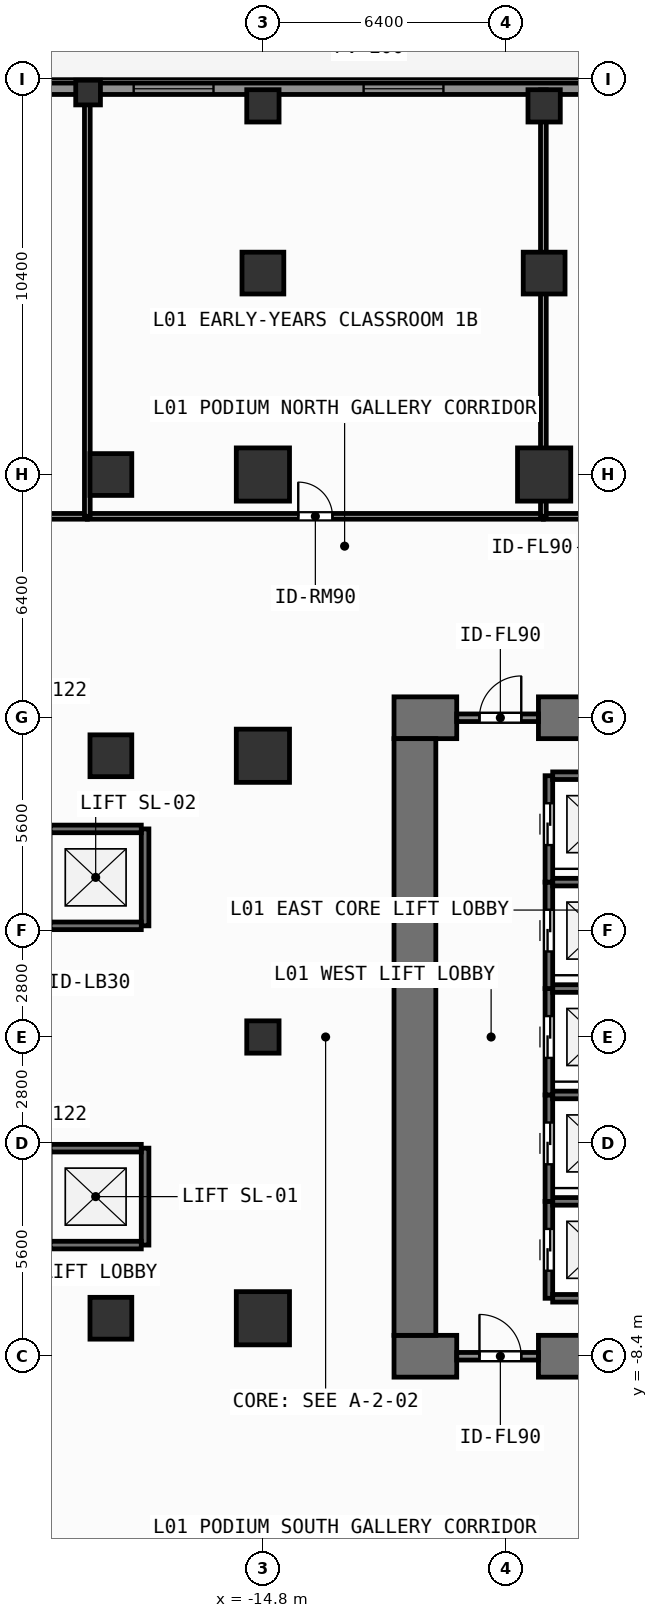
"""IFC4 building model, lengths in metres.
Left out: names, types, materials, properties, quantities, classifications, styles, units other than length and angle.
Written with IfcOpenShell. Run it as: python <this file> out.ifc"""

import sys

from ifc_helpers import new_model, si_unit, direction, frame, frame_2d, origin, origin_2d, place, context, subcontext, project, spatial, rectangle, extrude, element, fill, save


model = new_model("IFC4")
c1 = context("Model", 3, precision=1e-05, world=origin(), true_north=direction((0.0, 1.0)))
c2 = subcontext(c1, "Body", "Model", "MODEL_VIEW")
j1 = project(units=[si_unit("LENGTHUNIT", "METRE"), si_unit("PLANEANGLEUNIT", "RADIAN")], contexts=[c1])
p1 = place(None, origin())
s1 = spatial("IfcSite", under=j1, at=p1, CompositionType="ELEMENT")
p2 = place(p1, origin())
s2 = spatial("IfcBuilding", under=s1, at=p2, CompositionType="ELEMENT")
p3 = place(p2, origin())
s3 = spatial("IfcBuildingStorey", under=s2, at=p3, CompositionType="ELEMENT", Elevation=0.0)
p4 = place(p3, frame((-11.35, -8.4, 0.0), z_axis=(0.0, 0.0, 1.0), x_axis=(1.0, 0.0, 0.0)))
e1 = element("IfcWall", 1, at=p4, inside=s3, PredefinedType="SHEAR", context=c2, shape_type="SweptSolid", body=[
    extrude(rectangle(XDim=1.65, YDim=1.1, at=frame_2d((0.825, 0.0))), origin(), (0.0, 0.0, 1.0), 4.8),
])
p5 = place(p3, frame((-7.55, -8.4, 0.0), z_axis=(0.0, 0.0, 1.0), x_axis=(1.0, 0.0, 0.0)))
e2 = element("IfcWall", 2, at=p5, inside=s3, PredefinedType="SHEAR", context=c2, shape_type="SweptSolid", body=[
    extrude(rectangle(XDim=3.35, YDim=1.1, at=frame_2d((1.675, 0.0))), origin(), (0.0, 0.0, 1.0), 4.8),
])
p6 = place(p3, frame((-11.35, 8.4, 0.0), z_axis=(0.0, 0.0, 1.0), x_axis=(1.0, 0.0, 0.0)))
e3 = element("IfcWall", 3, at=p6, inside=s3, PredefinedType="SHEAR", context=c2, shape_type="SweptSolid", body=[
    extrude(rectangle(XDim=1.65, YDim=1.1, at=frame_2d((0.825, 0.0))), origin(), (0.0, 0.0, 1.0), 4.8),
])
p7 = place(p3, frame((-7.55, 8.4, 0.0), z_axis=(0.0, 0.0, 1.0), x_axis=(1.0, 0.0, 0.0)))
e4 = element("IfcWall", 4, at=p7, inside=s3, PredefinedType="SHEAR", context=c2, shape_type="SweptSolid", body=[
    extrude(rectangle(XDim=16.5, YDim=1.1, at=frame_2d((8.25, 0.0))), origin(), (0.0, 0.0, 1.0), 4.8),
])
p8 = place(p3, frame((-10.8, -7.85, 0.0), z_axis=(0.0, 0.0, 1.0), x_axis=(0.0, 1.0, 0.0)))
e5 = element("IfcWall", 5, at=p8, inside=s3, PredefinedType="SHEAR", context=c2, shape_type="SweptSolid", body=[
    extrude(rectangle(XDim=15.7, YDim=1.1, at=frame_2d((7.85, 0.0))), origin(), (0.0, 0.0, 1.0), 4.8),
])
for number, where, z_axis, x_axis in (
    (6, (-14.8, 14.8, 0.0), (0.0, 0.0, 1.0), (1.0, 0.0, 0.0)),
    (7, (-7.4, 14.8, 0.0), (0.0, 0.0, 1.0), (1.0, 0.0, 0.0)),
    (8, (-14.8, -7.4, 0.0), (0.0, 0.0, 1.0), (1.0, 0.0, 0.0)),
    (9, (-14.8, 7.4, 0.0), (0.0, 0.0, 1.0), (1.0, 0.0, 0.0)),
):
    element("IfcColumn", number, at=place(p3, frame(where, z_axis=z_axis, x_axis=x_axis)), inside=s3, PredefinedType="COLUMN", context=c2, shape_type="SweptSolid", body=[
        extrude(rectangle(XDim=1.4, YDim=1.4, at=origin_2d()), origin(), (0.0, 0.0, 1.0), 4.8),
    ])
for number, where, z_axis, x_axis in (
    (10, (-18.8, -7.4, 0.0), (0.0, 0.0, 1.0), (1.0, 0.0, 0.0)),
    (11, (-18.8, 7.4, 0.0), (0.0, 0.0, 1.0), (1.0, 0.0, 0.0)),
    (12, (-18.8, 14.8, 0.0), (0.0, 0.0, 1.0), (1.0, 0.0, 0.0)),
    (13, (-14.8, 20.1, 0.0), (0.0, 0.0, 1.0), (1.0, 0.0, 0.0)),
    (14, (-7.4, 20.1, 0.0), (0.0, 0.0, 1.0), (1.0, 0.0, 0.0)),
):
    element("IfcColumn", number, at=place(p3, frame(where, z_axis=z_axis, x_axis=x_axis)), inside=s3, PredefinedType="COLUMN", context=c2, shape_type="SweptSolid", body=[
        extrude(rectangle(XDim=1.1, YDim=1.1, at=origin_2d()), origin(), (0.0, 0.0, 1.0), 4.8),
    ])
for number, where, z_axis, x_axis in (
    (15, (-14.8, 0.0, 0.0), (0.0, 0.0, 1.0), (1.0, 0.0, 0.0)),
    (16, (-14.8, 24.5, 0.0), (0.0, 0.0, 1.0), (1.0, 0.0, 0.0)),
    (17, (-7.4, 24.5, 0.0), (0.0, 0.0, 1.0), (1.0, 0.0, 0.0)),
):
    element("IfcColumn", number, at=place(p3, frame(where, z_axis=z_axis, x_axis=x_axis)), inside=s3, PredefinedType="COLUMN", context=c2, shape_type="SweptSolid", body=[
        extrude(rectangle(XDim=0.85, YDim=0.85, at=origin_2d()), origin(), (0.0, 0.0, 1.0), 4.8),
    ])
p9 = place(p3, frame((-19.4, 24.85, 0.0), z_axis=(0.0, 0.0, 1.0), x_axis=(1.0, 0.0, 0.0)))
e18 = element("IfcColumn", 18, at=p9, inside=s3, PredefinedType="PILASTER", context=c2, shape_type="SweptSolid", body=[
    extrude(rectangle(XDim=0.65, YDim=0.65, at=origin_2d()), origin(), (0.0, 0.0, 1.0), 4.8),
])
p10 = place(p3, frame((-29.1, 24.95, 0.0), z_axis=(0.0, 0.0, 1.0), x_axis=(1.0, 0.0, 0.0)))
e19 = element("IfcWall", 19, at=p10, inside=s3, PredefinedType="SOLIDWALL", context=c2, shape_type="SweptSolid", body=[
    extrude(rectangle(XDim=58.2, YDim=0.3, at=frame_2d((29.1, 0.0))), origin(), (0.0, 0.0, 1.0), 4.56),
])
p11 = place(p10, frame((10.9, 0.0, 0.85)))
e20 = element("IfcOpeningElement", 20, at=p11, cuts=e19, PredefinedType="OPENING", context=c2, shape_type="SweptSolid", body=[
    extrude(rectangle(XDim=2.1, YDim=2.2, at=frame_2d((1.05, 1.1))), frame((0.0, 0.16, 0.0), z_axis=(0.0, -1.0, 0.0), x_axis=(1.0, 0.0, 0.0)), (0.0, 0.0, 1.0), 0.32),
])
p12 = place(p10, frame((16.95, 0.0, 0.85)))
e21 = element("IfcOpeningElement", 21, at=p12, cuts=e19, PredefinedType="OPENING", context=c2, shape_type="SweptSolid", body=[
    extrude(rectangle(XDim=2.1, YDim=2.2, at=frame_2d((1.05, 1.1))), frame((0.0, 0.16, 0.0), z_axis=(0.0, -1.0, 0.0), x_axis=(1.0, 0.0, 0.0)), (0.0, 0.0, 1.0), 0.32),
])
p13 = place(p10, frame((23.84, 0.0, 0.85)))
e22 = element("IfcOpeningElement", 22, at=p13, cuts=e19, PredefinedType="OPENING", context=c2, shape_type="SweptSolid", body=[
    extrude(rectangle(XDim=2.1, YDim=2.2, at=frame_2d((1.05, 1.1))), frame((0.0, 0.16, 0.0), z_axis=(0.0, -1.0, 0.0), x_axis=(1.0, 0.0, 0.0)), (0.0, 0.0, 1.0), 0.32),
])
p14 = place(p10, frame((30.44, 0.0, 0.85)))
e23 = element("IfcOpeningElement", 23, at=p14, cuts=e19, PredefinedType="OPENING", context=c2, shape_type="SweptSolid", body=[
    extrude(rectangle(XDim=2.1, YDim=2.2, at=frame_2d((1.05, 1.1))), frame((0.0, 0.16, 0.0), z_axis=(0.0, -1.0, 0.0), x_axis=(1.0, 0.0, 0.0)), (0.0, 0.0, 1.0), 0.32),
])
p15 = place(p10, frame((39.25, 0.0, 0.0)))
e24 = element("IfcOpeningElement", 24, at=p15, cuts=e19, PredefinedType="OPENING", context=c2, shape_type="SweptSolid", body=[
    extrude(rectangle(XDim=1.3, YDim=2.2, at=frame_2d((0.65, 1.1))), frame((0.0, 0.16, 0.0), z_axis=(0.0, -1.0, 0.0), x_axis=(1.0, 0.0, 0.0)), (0.0, 0.0, 1.0), 0.32),
])
p16 = place(p10, frame((49.25, 0.0, 0.0)))
e25 = element("IfcOpeningElement", 25, at=p16, cuts=e19, PredefinedType="OPENING", context=c2, shape_type="SweptSolid", body=[
    extrude(rectangle(XDim=1.3, YDim=2.2, at=frame_2d((0.65, 1.1))), frame((0.0, 0.16, 0.0), z_axis=(0.0, -1.0, 0.0), x_axis=(1.0, 0.0, 0.0)), (0.0, 0.0, 1.0), 0.32),
])
p17 = place(p3, frame((-17.9, -5.475, 0.0), z_axis=(0.0, 0.0, 1.0), x_axis=(0.0, 1.0, 0.0)))
e26 = element("IfcWall", 26, at=p17, inside=s3, PredefinedType="SHEAR", context=c2, shape_type="SweptSolid", body=[
    extrude(rectangle(XDim=2.55, YDim=0.2, at=frame_2d((1.275, 0.0))), origin(), (0.0, 0.0, 1.0), 4.56),
])
for number, where, z_axis, x_axis in (
    (27, (-20.4, -5.475, 0.0), (0.0, 0.0, 1.0), (1.0, 0.0, 0.0)),
    (28, (-20.4, -2.925, 0.0), (0.0, 0.0, 1.0), (1.0, 0.0, 0.0)),
):
    element("IfcWall", number, at=place(p3, frame(where, z_axis=z_axis, x_axis=x_axis)), inside=s3, PredefinedType="SHEAR", context=c2, shape_type="SweptSolid", body=[
        extrude(rectangle(XDim=2.4, YDim=0.2, at=frame_2d((1.2, 0.0))), origin(), (0.0, 0.0, 1.0), 4.56),
    ])
p18 = place(p3, frame((-17.9, 2.925, 0.0), z_axis=(0.0, 0.0, 1.0), x_axis=(0.0, 1.0, 0.0)))
e29 = element("IfcWall", 29, at=p18, inside=s3, PredefinedType="SHEAR", context=c2, shape_type="SweptSolid", body=[
    extrude(rectangle(XDim=2.55, YDim=0.2, at=frame_2d((1.275, 0.0))), origin(), (0.0, 0.0, 1.0), 4.56),
])
for number, where, z_axis, x_axis in (
    (30, (-20.4, 2.925, 0.0), (0.0, 0.0, 1.0), (1.0, 0.0, 0.0)),
    (31, (-20.4, 5.475, 0.0), (0.0, 0.0, 1.0), (1.0, 0.0, 0.0)),
):
    element("IfcWall", number, at=place(p3, frame(where, z_axis=z_axis, x_axis=x_axis)), inside=s3, PredefinedType="SHEAR", context=c2, shape_type="SweptSolid", body=[
        extrude(rectangle(XDim=2.4, YDim=0.2, at=frame_2d((1.2, 0.0))), origin(), (0.0, 0.0, 1.0), 4.56),
    ])
p19 = place(p3, frame((-7.275, -6.875, 0.0), z_axis=(0.0, 0.0, 1.0), x_axis=(0.0, 1.0, 0.0)))
e32 = element("IfcWall", 32, at=p19, inside=s3, PredefinedType="SHEAR", context=c2, shape_type="SweptSolid", body=[
    extrude(rectangle(XDim=2.55, YDim=0.2, at=frame_2d((1.275, 0.0))), origin(), (0.0, 0.0, 1.0), 4.56),
])
p20 = place(p19, frame((0.725, 0.0, 0.0)))
e33 = element("IfcOpeningElement", 33, at=p20, cuts=e32, PredefinedType="OPENING", context=c2, shape_type="SweptSolid", body=[
    extrude(rectangle(XDim=1.1, YDim=2.2, at=frame_2d((0.55, 1.1))), frame((0.0, 0.11, 0.0), z_axis=(0.0, -1.0, 0.0), x_axis=(1.0, 0.0, 0.0)), (0.0, 0.0, 1.0), 0.22),
])
for number, where, z_axis, x_axis in (
    (34, (-7.175, -6.875, 0.0), (0.0, 0.0, 1.0), (1.0, 0.0, 0.0)),
    (35, (-7.175, -4.325, 0.0), (0.0, 0.0, 1.0), (1.0, 0.0, 0.0)),
):
    element("IfcWall", number, at=place(p3, frame(where, z_axis=z_axis, x_axis=x_axis)), inside=s3, PredefinedType="SHEAR", context=c2, shape_type="SweptSolid", body=[
        extrude(rectangle(XDim=2.35, YDim=0.2, at=frame_2d((1.175, 0.0))), origin(), (0.0, 0.0, 1.0), 4.56),
    ])
p21 = place(p3, frame((-7.275, -4.325, 0.0), z_axis=(0.0, 0.0, 1.0), x_axis=(0.0, 1.0, 0.0)))
e36 = element("IfcWall", 36, at=p21, inside=s3, PredefinedType="SHEAR", context=c2, shape_type="SweptSolid", body=[
    extrude(rectangle(XDim=2.8, YDim=0.2, at=frame_2d((1.4, 0.0))), origin(), (0.0, 0.0, 1.0), 4.56),
])
p22 = place(p21, frame((0.975, 0.0, 0.0)))
e37 = element("IfcOpeningElement", 37, at=p22, cuts=e36, PredefinedType="OPENING", context=c2, shape_type="SweptSolid", body=[
    extrude(rectangle(XDim=1.1, YDim=2.2, at=frame_2d((0.55, 1.1))), frame((0.0, 0.11, 0.0), z_axis=(0.0, -1.0, 0.0), x_axis=(1.0, 0.0, 0.0)), (0.0, 0.0, 1.0), 0.22),
])
p23 = place(p3, frame((-7.175, -1.525, 0.0), z_axis=(0.0, 0.0, 1.0), x_axis=(1.0, 0.0, 0.0)))
e38 = element("IfcWall", 38, at=p23, inside=s3, PredefinedType="SHEAR", context=c2, shape_type="SweptSolid", body=[
    extrude(rectangle(XDim=2.35, YDim=0.2, at=frame_2d((1.175, 0.0))), origin(), (0.0, 0.0, 1.0), 4.56),
])
p24 = place(p3, frame((-7.275, -1.525, 0.0), z_axis=(0.0, 0.0, 1.0), x_axis=(0.0, 1.0, 0.0)))
e39 = element("IfcWall", 39, at=p24, inside=s3, PredefinedType="SHEAR", context=c2, shape_type="SweptSolid", body=[
    extrude(rectangle(XDim=2.8, YDim=0.2, at=frame_2d((1.4, 0.0))), origin(), (0.0, 0.0, 1.0), 4.56),
])
p25 = place(p24, frame((0.975, 0.0, 0.0)))
e40 = element("IfcOpeningElement", 40, at=p25, cuts=e39, PredefinedType="OPENING", context=c2, shape_type="SweptSolid", body=[
    extrude(rectangle(XDim=1.1, YDim=2.2, at=frame_2d((0.55, 1.1))), frame((0.0, 0.11, 0.0), z_axis=(0.0, -1.0, 0.0), x_axis=(1.0, 0.0, 0.0)), (0.0, 0.0, 1.0), 0.22),
])
p26 = place(p3, frame((-7.175, 1.275, 0.0), z_axis=(0.0, 0.0, 1.0), x_axis=(1.0, 0.0, 0.0)))
e41 = element("IfcWall", 41, at=p26, inside=s3, PredefinedType="SHEAR", context=c2, shape_type="SweptSolid", body=[
    extrude(rectangle(XDim=2.35, YDim=0.2, at=frame_2d((1.175, 0.0))), origin(), (0.0, 0.0, 1.0), 4.56),
])
p27 = place(p3, frame((-7.275, 1.275, 0.0), z_axis=(0.0, 0.0, 1.0), x_axis=(0.0, 1.0, 0.0)))
e42 = element("IfcWall", 42, at=p27, inside=s3, PredefinedType="SHEAR", context=c2, shape_type="SweptSolid", body=[
    extrude(rectangle(XDim=2.8, YDim=0.2, at=frame_2d((1.4, 0.0))), origin(), (0.0, 0.0, 1.0), 4.56),
])
p28 = place(p27, frame((0.975, 0.0, 0.0)))
e43 = element("IfcOpeningElement", 43, at=p28, cuts=e42, PredefinedType="OPENING", context=c2, shape_type="SweptSolid", body=[
    extrude(rectangle(XDim=1.1, YDim=2.2, at=frame_2d((0.55, 1.1))), frame((0.0, 0.11, 0.0), z_axis=(0.0, -1.0, 0.0), x_axis=(1.0, 0.0, 0.0)), (0.0, 0.0, 1.0), 0.22),
])
p29 = place(p3, frame((-7.175, 4.075, 0.0), z_axis=(0.0, 0.0, 1.0), x_axis=(1.0, 0.0, 0.0)))
e44 = element("IfcWall", 44, at=p29, inside=s3, PredefinedType="SHEAR", context=c2, shape_type="SweptSolid", body=[
    extrude(rectangle(XDim=2.35, YDim=0.2, at=frame_2d((1.175, 0.0))), origin(), (0.0, 0.0, 1.0), 4.56),
])
p30 = place(p3, frame((-7.275, 4.075, 0.0), z_axis=(0.0, 0.0, 1.0), x_axis=(0.0, 1.0, 0.0)))
e45 = element("IfcWall", 45, at=p30, inside=s3, PredefinedType="SHEAR", context=c2, shape_type="SweptSolid", body=[
    extrude(rectangle(XDim=2.8, YDim=0.2, at=frame_2d((1.4, 0.0))), origin(), (0.0, 0.0, 1.0), 4.56),
])
p31 = place(p30, frame((0.975, 0.0, 0.0)))
e46 = element("IfcOpeningElement", 46, at=p31, cuts=e45, PredefinedType="OPENING", context=c2, shape_type="SweptSolid", body=[
    extrude(rectangle(XDim=1.1, YDim=2.2, at=frame_2d((0.55, 1.1))), frame((0.0, 0.11, 0.0), z_axis=(0.0, -1.0, 0.0), x_axis=(1.0, 0.0, 0.0)), (0.0, 0.0, 1.0), 0.22),
])
p32 = place(p3, frame((-7.175, 6.875, 0.0), z_axis=(0.0, 0.0, 1.0), x_axis=(1.0, 0.0, 0.0)))
e47 = element("IfcWall", 47, at=p32, inside=s3, PredefinedType="SHEAR", context=c2, shape_type="SweptSolid", body=[
    extrude(rectangle(XDim=2.35, YDim=0.2, at=frame_2d((1.175, 0.0))), origin(), (0.0, 0.0, 1.0), 4.56),
])
p33 = place(p3, frame((-9.7, -8.4, 0.0), z_axis=(0.0, 0.0, 1.0), x_axis=(1.0, 0.0, 0.0)))
e48 = element("IfcWall", 48, at=p33, inside=s3, PredefinedType="SOLIDWALL", context=c2, shape_type="SweptSolid", body=[
    extrude(rectangle(XDim=2.15, YDim=0.2, at=frame_2d((1.075, 0.0))), origin(), (0.0, 0.0, 1.0), 3.6),
])
p34 = place(p33, frame((0.598, 0.0, 0.0)))
e49 = element("IfcOpeningElement", 49, at=p34, cuts=e48, PredefinedType="OPENING", context=c2, shape_type="SweptSolid", body=[
    extrude(rectangle(XDim=1.1, YDim=2.15, at=frame_2d((0.55, 1.075))), frame((0.0, 0.11, 0.0), z_axis=(0.0, -1.0, 0.0), x_axis=(1.0, 0.0, 0.0)), (0.0, 0.0, 1.0), 0.22),
])
p35 = place(p3, frame((-9.7, 8.4, 0.0), z_axis=(0.0, 0.0, 1.0), x_axis=(1.0, 0.0, 0.0)))
e50 = element("IfcWall", 50, at=p35, inside=s3, PredefinedType="SOLIDWALL", context=c2, shape_type="SweptSolid", body=[
    extrude(rectangle(XDim=2.15, YDim=0.2, at=frame_2d((1.075, 0.0))), origin(), (0.0, 0.0, 1.0), 3.6),
])
p36 = place(p35, frame((0.598, 0.0, 0.0)))
e51 = element("IfcOpeningElement", 51, at=p36, cuts=e50, PredefinedType="OPENING", context=c2, shape_type="SweptSolid", body=[
    extrude(rectangle(XDim=1.1, YDim=2.15, at=frame_2d((0.55, 1.075))), frame((0.0, 0.11, 0.0), z_axis=(0.0, -1.0, 0.0), x_axis=(1.0, 0.0, 0.0)), (0.0, 0.0, 1.0), 0.22),
])
p37 = place(p3, frame((-33.42, 13.7, 0.0), z_axis=(0.0, 0.0, 1.0), x_axis=(1.0, 0.0, 0.0)))
e52 = element("IfcWall", 52, at=p37, inside=s3, PredefinedType="PARTITIONING", context=c2, shape_type="SweptSolid", body=[
    extrude(rectangle(XDim=14.0, YDim=0.15, at=frame_2d((7.0, 0.0))), origin(), (0.0, 0.0, 1.0), 4.56),
])
p38 = place(p37, frame((6.55, 0.0, 0.0)))
e53 = element("IfcOpeningElement", 53, at=p38, cuts=e52, PredefinedType="OPENING", context=c2, shape_type="SweptSolid", body=[
    extrude(rectangle(XDim=0.9, YDim=2.1, at=frame_2d((0.45, 1.05))), frame((0.0, 0.085, 0.0), z_axis=(0.0, -1.0, 0.0), x_axis=(1.0, 0.0, 0.0)), (0.0, 0.0, 1.0), 0.17),
])
p39 = place(p3, frame((-19.42, 13.7, 0.0), z_axis=(0.0, 0.0, 1.0), x_axis=(1.0, 0.0, 0.0)))
e54 = element("IfcWall", 54, at=p39, inside=s3, PredefinedType="PARTITIONING", context=c2, shape_type="SweptSolid", body=[
    extrude(rectangle(XDim=12.0, YDim=0.15, at=frame_2d((6.0, 0.0))), origin(), (0.0, 0.0, 1.0), 4.56),
])
p40 = place(p39, frame((5.55, 0.0, 0.0)))
e55 = element("IfcOpeningElement", 55, at=p40, cuts=e54, PredefinedType="OPENING", context=c2, shape_type="SweptSolid", body=[
    extrude(rectangle(XDim=0.9, YDim=2.1, at=frame_2d((0.45, 1.05))), frame((0.0, 0.085, 0.0), z_axis=(0.0, -1.0, 0.0), x_axis=(1.0, 0.0, 0.0)), (0.0, 0.0, 1.0), 0.17),
])
p41 = place(p3, frame((-7.42, 13.7, 0.0), z_axis=(0.0, 0.0, 1.0), x_axis=(1.0, 0.0, 0.0)))
e56 = element("IfcWall", 56, at=p41, inside=s3, PredefinedType="PARTITIONING", context=c2, shape_type="SweptSolid", body=[
    extrude(rectangle(XDim=5.9, YDim=0.15, at=frame_2d((2.95, 0.0))), origin(), (0.0, 0.0, 1.0), 4.56),
])
p42 = place(p41, frame((2.587, 0.0, 0.0)))
e57 = element("IfcOpeningElement", 57, at=p42, cuts=e56, PredefinedType="OPENING", context=c2, shape_type="SweptSolid", body=[
    extrude(rectangle(XDim=0.9, YDim=2.1, at=frame_2d((0.45, 1.05))), frame((0.0, 0.085, 0.0), z_axis=(0.0, -1.0, 0.0), x_axis=(1.0, 0.0, 0.0)), (0.0, 0.0, 1.0), 0.17),
])
p43 = place(p3, frame((-19.42, 13.7, 0.0), z_axis=(0.0, 0.0, 1.0), x_axis=(0.0, 1.0, 0.0)))
e58 = element("IfcWall", 58, at=p43, inside=s3, PredefinedType="PARTITIONING", context=c2, shape_type="SweptSolid", body=[
    extrude(rectangle(XDim=11.22, YDim=0.15, at=frame_2d((5.61, 0.0))), origin(), (0.0, 0.0, 1.0), 4.56),
])
p44 = place(p3, frame((-7.42, 13.7, 0.0), z_axis=(0.0, 0.0, 1.0), x_axis=(0.0, 1.0, 0.0)))
e59 = element("IfcWall", 59, at=p44, inside=s3, PredefinedType="PARTITIONING", context=c2, shape_type="SweptSolid", body=[
    extrude(rectangle(XDim=11.22, YDim=0.15, at=frame_2d((5.61, 0.0))), origin(), (0.0, 0.0, 1.0), 3.85),
])
p45 = place(p11, origin())
e60 = element("IfcWindow", 60, at=p45, inside=s3, PartitioningType="SINGLE_PANEL", PredefinedType="WINDOW", context=c2, shape_type="SweptSolid", body=[
    extrude(rectangle(XDim=2.1, YDim=2.2, at=frame_2d((1.05, 1.1))), frame((0.0, 0.03, 0.0), z_axis=(0.0, -1.0, 0.0), x_axis=(1.0, 0.0, 0.0)), (0.0, 0.0, 1.0), 0.06),
])
fill(e20, e60)
p46 = place(p12, origin())
e61 = element("IfcWindow", 61, at=p46, inside=s3, PartitioningType="SINGLE_PANEL", PredefinedType="WINDOW", context=c2, shape_type="SweptSolid", body=[
    extrude(rectangle(XDim=2.1, YDim=2.2, at=frame_2d((1.05, 1.1))), frame((0.0, 0.03, 0.0), z_axis=(0.0, -1.0, 0.0), x_axis=(1.0, 0.0, 0.0)), (0.0, 0.0, 1.0), 0.06),
])
fill(e21, e61)
p47 = place(p20, origin())
e62 = element("IfcDoor", 62, at=p47, inside=s3, OperationType="SLIDING_TO_LEFT", PredefinedType="DOOR", context=c2, shape_type="SweptSolid", body=[
    extrude(rectangle(XDim=1.1, YDim=2.2, at=frame_2d((0.55, 1.1))), frame((0.0, 0.025, 0.0), z_axis=(0.0, -1.0, 0.0), x_axis=(1.0, 0.0, 0.0)), (0.0, 0.0, 1.0), 0.05),
])
fill(e33, e62)
p48 = place(p22, origin())
e63 = element("IfcDoor", 63, at=p48, inside=s3, OperationType="SLIDING_TO_LEFT", PredefinedType="DOOR", context=c2, shape_type="SweptSolid", body=[
    extrude(rectangle(XDim=1.1, YDim=2.2, at=frame_2d((0.55, 1.1))), frame((0.0, 0.025, 0.0), z_axis=(0.0, -1.0, 0.0), x_axis=(1.0, 0.0, 0.0)), (0.0, 0.0, 1.0), 0.05),
])
fill(e37, e63)
p49 = place(p25, origin())
e64 = element("IfcDoor", 64, at=p49, inside=s3, OperationType="SLIDING_TO_LEFT", PredefinedType="DOOR", context=c2, shape_type="SweptSolid", body=[
    extrude(rectangle(XDim=1.1, YDim=2.2, at=frame_2d((0.55, 1.1))), frame((0.0, 0.025, 0.0), z_axis=(0.0, -1.0, 0.0), x_axis=(1.0, 0.0, 0.0)), (0.0, 0.0, 1.0), 0.05),
])
fill(e40, e64)
p50 = place(p28, origin())
e65 = element("IfcDoor", 65, at=p50, inside=s3, OperationType="SLIDING_TO_LEFT", PredefinedType="DOOR", context=c2, shape_type="SweptSolid", body=[
    extrude(rectangle(XDim=1.1, YDim=2.2, at=frame_2d((0.55, 1.1))), frame((0.0, 0.025, 0.0), z_axis=(0.0, -1.0, 0.0), x_axis=(1.0, 0.0, 0.0)), (0.0, 0.0, 1.0), 0.05),
])
fill(e43, e65)
p51 = place(p31, origin())
e66 = element("IfcDoor", 66, at=p51, inside=s3, OperationType="SLIDING_TO_LEFT", PredefinedType="DOOR", context=c2, shape_type="SweptSolid", body=[
    extrude(rectangle(XDim=1.1, YDim=2.2, at=frame_2d((0.55, 1.1))), frame((0.0, 0.025, 0.0), z_axis=(0.0, -1.0, 0.0), x_axis=(1.0, 0.0, 0.0)), (0.0, 0.0, 1.0), 0.05),
])
fill(e46, e66)
p52 = place(p34, origin())
e67 = element("IfcDoor", 67, at=p52, inside=s3, OperationType="SINGLE_SWING_LEFT", PredefinedType="DOOR", context=c2, shape_type="SweptSolid", body=[
    extrude(rectangle(XDim=1.1, YDim=2.15, at=frame_2d((0.55, 1.075))), frame((0.0, 0.025, 0.0), z_axis=(0.0, -1.0, 0.0), x_axis=(1.0, 0.0, 0.0)), (0.0, 0.0, 1.0), 0.05),
])
fill(e49, e67)
p53 = place(p36, origin())
e68 = element("IfcDoor", 68, at=p53, inside=s3, OperationType="SINGLE_SWING_RIGHT", PredefinedType="DOOR", context=c2, shape_type="SweptSolid", body=[
    extrude(rectangle(XDim=1.1, YDim=2.15, at=frame_2d((0.55, 1.075))), frame((0.0, 0.025, 0.0), z_axis=(0.0, -1.0, 0.0), x_axis=(1.0, 0.0, 0.0)), (0.0, 0.0, 1.0), 0.05),
])
fill(e51, e68)
p54 = place(p40, origin())
e69 = element("IfcDoor", 69, at=p54, inside=s3, OperationType="SINGLE_SWING_LEFT", PredefinedType="DOOR", context=c2, shape_type="SweptSolid", body=[
    extrude(rectangle(XDim=0.9, YDim=2.1, at=frame_2d((0.45, 1.05))), frame((0.0, 0.025, 0.0), z_axis=(0.0, -1.0, 0.0), x_axis=(1.0, 0.0, 0.0)), (0.0, 0.0, 1.0), 0.05),
])
fill(e55, e69)
save(model, sys.argv[1])
